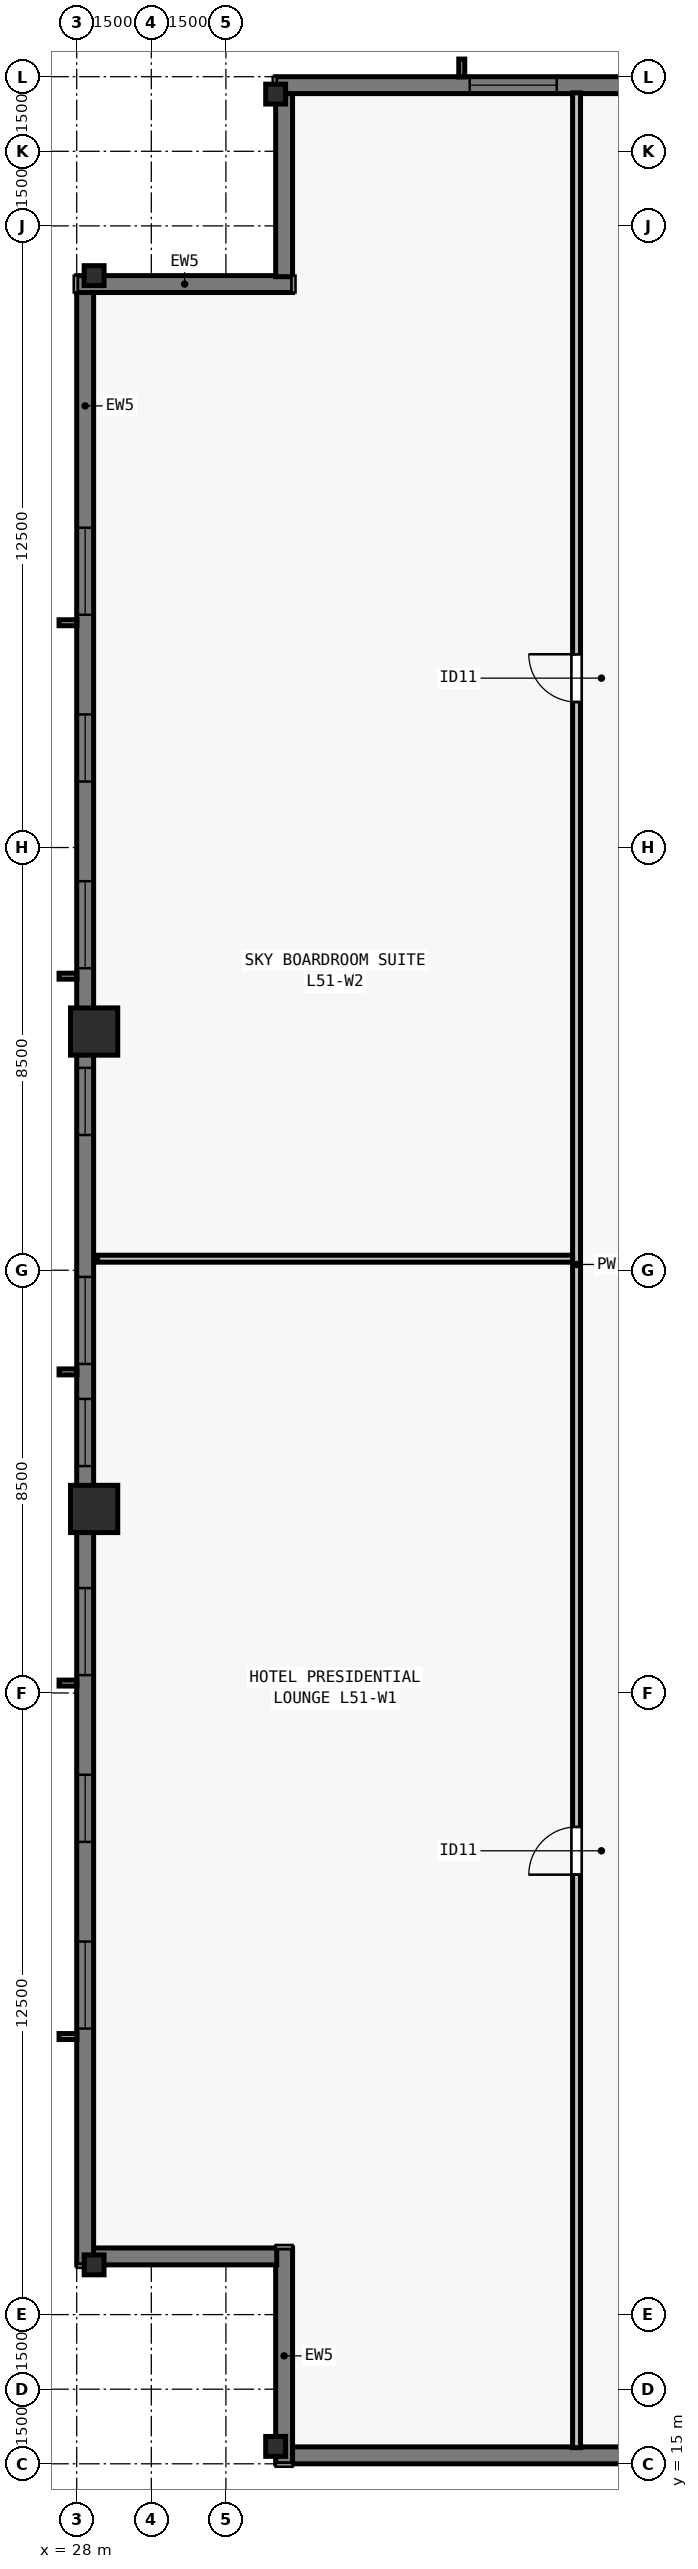
"""IFC4 building model, lengths in metres.
Left out: names, types, materials, properties, quantities, classifications, styles, units other than length and angle.
Written with IfcOpenShell. Run it as: python <this file> out.ifc"""

import sys

from ifc_helpers import new_model, si_unit, direction, frame, frame_2d, origin, origin_2d, place, context, subcontext, project, spatial, rectangle, i_section, extrude, element, fill, save


model = new_model("IFC4")
c1 = context("Model", 3, precision=1e-05, world=origin(), true_north=direction((0.0, 1.0)))
c2 = subcontext(c1, "Body", "Model", "MODEL_VIEW")
j1 = project(units=[si_unit("LENGTHUNIT", "METRE"), si_unit("PLANEANGLEUNIT", "RADIAN")], contexts=[c1])
p1 = place(None, origin())
s1 = spatial("IfcSite", under=j1, at=p1, CompositionType="ELEMENT")
p2 = place(p1, origin())
s2 = spatial("IfcBuilding", under=s1, at=p2, CompositionType="ELEMENT")
p3 = place(p2, frame((0.0, 0.0, 186.5)))
s3 = spatial("IfcBuildingStorey", under=s2, at=p3, CompositionType="ELEMENT", Elevation=186.5)
for number, where, z_axis, x_axis in (
    (1, (32.0, 15.35, 0.0), (0.0, 0.0, 1.0), (1.0, 0.0, 0.0)),
    (2, (32.0, 62.65, 0.0), (0.0, 0.0, 1.0), (1.0, 0.0, 0.0)),
    (3, (28.35, 59.0, 0.0), (0.0, 0.0, 1.0), (0.0, 1.0, 0.0)),
):
    element("IfcColumn", number, at=place(p3, frame(where, z_axis=z_axis, x_axis=x_axis)), inside=s3, PredefinedType="COLUMN", context=c2, shape_type="SweptSolid", body=[
        extrude(i_section(OverallWidth=0.4, OverallDepth=0.4, WebThickness=0.022, FlangeThickness=0.036, at=origin_2d()), origin(), (0.0, 0.0, 1.0), 3.5),
    ])
for number, where, z_axis, x_axis in (
    (4, (28.35, 43.8, 0.0), (0.0, 0.0, 1.0), (0.0, 1.0, 0.0)),
    (5, (28.35, 34.2, 0.0), (0.0, 0.0, 1.0), (0.0, 1.0, 0.0)),
):
    element("IfcColumn", number, at=place(p3, frame(where, z_axis=z_axis, x_axis=x_axis)), inside=s3, PredefinedType="COLUMN", context=c2, shape_type="SweptSolid", body=[
        extrude(rectangle(XDim=0.95, YDim=0.95, at=origin_2d()), origin(), (0.0, 0.0, 1.0), 3.5),
    ])
p4 = place(p3, frame((28.35, 19.0, 0.0), z_axis=(0.0, 0.0, 1.0), x_axis=(0.0, 1.0, 0.0)))
e6 = element("IfcColumn", 6, at=p4, inside=s3, PredefinedType="COLUMN", context=c2, shape_type="SweptSolid", body=[
    extrude(i_section(OverallWidth=0.4, OverallDepth=0.4, WebThickness=0.022, FlangeThickness=0.036, at=origin_2d()), origin(), (0.0, 0.0, 1.0), 3.5),
])
p5 = place(p3, frame((72.0, 15.17, 0.0), z_axis=(0.0, 0.0, 1.0), x_axis=(-1.0, 0.0, 0.0)))
e7 = element("IfcWall", 7, at=p5, inside=s3, PredefinedType="SOLIDWALL", context=c2, shape_type="SweptSolid", body=[
    extrude(rectangle(XDim=39.682, YDim=0.34, at=frame_2d((19.841, 0.0))), origin(), (0.0, 0.0, 1.0), 3.28),
])
p6 = place(p5, frame((11.859, 0.0, 0.8)))
e8 = element("IfcOpeningElement", 8, at=p6, cuts=e7, PredefinedType="OPENING", context=c2, shape_type="SweptSolid", body=[
    extrude(rectangle(XDim=1.75, YDim=1.66, at=frame_2d((0.875, 0.83))), frame((0.0, 0.18, 0.0), z_axis=(0.0, -1.0, 0.0), x_axis=(1.0, 0.0, 0.0)), (0.0, 0.0, 1.0), 0.36),
])
p7 = place(p5, frame((18.966, 0.0, 0.8)))
e9 = element("IfcOpeningElement", 9, at=p7, cuts=e7, PredefinedType="OPENING", context=c2, shape_type="SweptSolid", body=[
    extrude(rectangle(XDim=1.75, YDim=1.66, at=frame_2d((0.875, 0.83))), frame((0.0, 0.18, 0.0), z_axis=(0.0, -1.0, 0.0), x_axis=(1.0, 0.0, 0.0)), (0.0, 0.0, 1.0), 0.36),
])
p8 = place(p5, frame((22.27, 0.0, 0.8)))
e10 = element("IfcOpeningElement", 10, at=p8, cuts=e7, PredefinedType="OPENING", context=c2, shape_type="SweptSolid", body=[
    extrude(rectangle(XDim=1.35, YDim=1.66, at=frame_2d((0.675, 0.83))), frame((0.0, 0.18, 0.0), z_axis=(0.0, -1.0, 0.0), x_axis=(1.0, 0.0, 0.0)), (0.0, 0.0, 1.0), 0.36),
])
p9 = place(p5, frame((26.073, 0.0, 0.8)))
e11 = element("IfcOpeningElement", 11, at=p9, cuts=e7, PredefinedType="OPENING", context=c2, shape_type="SweptSolid", body=[
    extrude(rectangle(XDim=1.75, YDim=1.66, at=frame_2d((0.875, 0.83))), frame((0.0, 0.18, 0.0), z_axis=(0.0, -1.0, 0.0), x_axis=(1.0, 0.0, 0.0)), (0.0, 0.0, 1.0), 0.36),
])
p10 = place(p5, frame((29.827, 0.0, 0.8)))
e12 = element("IfcOpeningElement", 12, at=p10, cuts=e7, PredefinedType="OPENING", context=c2, shape_type="SweptSolid", body=[
    extrude(rectangle(XDim=1.35, YDim=1.66, at=frame_2d((0.675, 0.83))), frame((0.0, 0.18, 0.0), z_axis=(0.0, -1.0, 0.0), x_axis=(1.0, 0.0, 0.0)), (0.0, 0.0, 1.0), 0.36),
])
p11 = place(p3, frame((32.17, 15.0, 0.0), z_axis=(0.0, 0.0, 1.0), x_axis=(0.0, 1.0, 0.0)))
e13 = element("IfcWall", 13, at=p11, inside=s3, PredefinedType="SOLIDWALL", context=c2, shape_type="SweptSolid", body=[
    extrude(rectangle(XDim=4.34, YDim=0.34, at=frame_2d((2.17, 0.0))), origin(), (0.0, 0.0, 1.0), 3.28),
])
p12 = place(p3, frame((32.022, 19.17, 0.0), z_axis=(0.0, 0.0, 1.0), x_axis=(-1.0, 0.0, 0.0)))
e14 = element("IfcWall", 14, at=p12, inside=s3, PredefinedType="SOLIDWALL", context=c2, shape_type="SweptSolid", body=[
    extrude(rectangle(XDim=3.704, YDim=0.34, at=frame_2d((1.852, 0.0))), origin(), (0.0, 0.0, 1.0), 3.28),
])
p13 = place(p3, frame((28.17, 19.0, 0.0), z_axis=(0.0, 0.0, 1.0), x_axis=(0.0, 1.0, 0.0)))
e15 = element("IfcWall", 15, at=p13, inside=s3, PredefinedType="SOLIDWALL", context=c2, shape_type="SweptSolid", body=[
    extrude(rectangle(XDim=39.682, YDim=0.34, at=frame_2d((19.841, 0.0))), origin(), (0.0, 0.0, 1.0), 3.28),
])
p14 = place(p13, frame((4.752, 0.0, 0.8)))
e16 = element("IfcOpeningElement", 16, at=p14, cuts=e15, PredefinedType="OPENING", context=c2, shape_type="SweptSolid", body=[
    extrude(rectangle(XDim=1.75, YDim=1.66, at=frame_2d((0.875, 0.83))), frame((0.0, 0.18, 0.0), z_axis=(0.0, -1.0, 0.0), x_axis=(1.0, 0.0, 0.0)), (0.0, 0.0, 1.0), 0.36),
])
p15 = place(p13, frame((8.505, 0.0, 0.8)))
e17 = element("IfcOpeningElement", 17, at=p15, cuts=e15, PredefinedType="OPENING", context=c2, shape_type="SweptSolid", body=[
    extrude(rectangle(XDim=1.35, YDim=1.66, at=frame_2d((0.675, 0.83))), frame((0.0, 0.18, 0.0), z_axis=(0.0, -1.0, 0.0), x_axis=(1.0, 0.0, 0.0)), (0.0, 0.0, 1.0), 0.36),
])
p16 = place(p13, frame((11.859, 0.0, 0.8)))
e18 = element("IfcOpeningElement", 18, at=p16, cuts=e15, PredefinedType="OPENING", context=c2, shape_type="SweptSolid", body=[
    extrude(rectangle(XDim=1.75, YDim=1.66, at=frame_2d((0.875, 0.83))), frame((0.0, 0.18, 0.0), z_axis=(0.0, -1.0, 0.0), x_axis=(1.0, 0.0, 0.0)), (0.0, 0.0, 1.0), 0.36),
])
p17 = place(p13, frame((16.062, 0.0, 0.8)))
e19 = element("IfcOpeningElement", 19, at=p17, cuts=e15, PredefinedType="OPENING", context=c2, shape_type="SweptSolid", body=[
    extrude(rectangle(XDim=1.35, YDim=1.66, at=frame_2d((0.675, 0.83))), frame((0.0, 0.18, 0.0), z_axis=(0.0, -1.0, 0.0), x_axis=(1.0, 0.0, 0.0)), (0.0, 0.0, 1.0), 0.36),
])
p18 = place(p13, frame((18.116, 0.0, 0.8)))
e20 = element("IfcOpeningElement", 20, at=p18, cuts=e15, PredefinedType="OPENING", context=c2, shape_type="SweptSolid", body=[
    extrude(rectangle(XDim=1.75, YDim=1.66, at=frame_2d((0.875, 0.83))), frame((0.0, 0.18, 0.0), z_axis=(0.0, -1.0, 0.0), x_axis=(1.0, 0.0, 0.0)), (0.0, 0.0, 1.0), 0.36),
])
p19 = place(p13, frame((22.719, 0.0, 0.8)))
e21 = element("IfcOpeningElement", 21, at=p19, cuts=e15, PredefinedType="OPENING", context=c2, shape_type="SweptSolid", body=[
    extrude(rectangle(XDim=1.35, YDim=1.66, at=frame_2d((0.675, 0.83))), frame((0.0, 0.18, 0.0), z_axis=(0.0, -1.0, 0.0), x_axis=(1.0, 0.0, 0.0)), (0.0, 0.0, 1.0), 0.36),
])
p20 = place(p13, frame((26.073, 0.0, 0.8)))
e22 = element("IfcOpeningElement", 22, at=p20, cuts=e15, PredefinedType="OPENING", context=c2, shape_type="SweptSolid", body=[
    extrude(rectangle(XDim=1.75, YDim=1.66, at=frame_2d((0.875, 0.83))), frame((0.0, 0.18, 0.0), z_axis=(0.0, -1.0, 0.0), x_axis=(1.0, 0.0, 0.0)), (0.0, 0.0, 1.0), 0.36),
])
p21 = place(p13, frame((29.827, 0.0, 0.8)))
e23 = element("IfcOpeningElement", 23, at=p21, cuts=e15, PredefinedType="OPENING", context=c2, shape_type="SweptSolid", body=[
    extrude(rectangle(XDim=1.35, YDim=1.66, at=frame_2d((0.675, 0.83))), frame((0.0, 0.18, 0.0), z_axis=(0.0, -1.0, 0.0), x_axis=(1.0, 0.0, 0.0)), (0.0, 0.0, 1.0), 0.36),
])
p22 = place(p13, frame((33.18, 0.0, 0.8)))
e24 = element("IfcOpeningElement", 24, at=p22, cuts=e15, PredefinedType="OPENING", context=c2, shape_type="SweptSolid", body=[
    extrude(rectangle(XDim=1.75, YDim=1.66, at=frame_2d((0.875, 0.83))), frame((0.0, 0.18, 0.0), z_axis=(0.0, -1.0, 0.0), x_axis=(1.0, 0.0, 0.0)), (0.0, 0.0, 1.0), 0.36),
])
p23 = place(p3, frame((28.0, 58.83, 0.0), z_axis=(0.0, 0.0, 1.0), x_axis=(1.0, 0.0, 0.0)))
e25 = element("IfcWall", 25, at=p23, inside=s3, PredefinedType="SOLIDWALL", context=c2, shape_type="SweptSolid", body=[
    extrude(rectangle(XDim=4.34, YDim=0.34, at=frame_2d((2.17, 0.0))), origin(), (0.0, 0.0, 1.0), 3.28),
])
p24 = place(p3, frame((32.17, 58.978, 0.0), z_axis=(0.0, 0.0, 1.0), x_axis=(0.0, 1.0, 0.0)))
e26 = element("IfcWall", 26, at=p24, inside=s3, PredefinedType="SOLIDWALL", context=c2, shape_type="SweptSolid", body=[
    extrude(rectangle(XDim=3.704, YDim=0.34, at=frame_2d((1.852, 0.0))), origin(), (0.0, 0.0, 1.0), 3.28),
])
p25 = place(p3, frame((32.0, 62.83, 0.0), z_axis=(0.0, 0.0, 1.0), x_axis=(1.0, 0.0, 0.0)))
e27 = element("IfcWall", 27, at=p25, inside=s3, PredefinedType="SOLIDWALL", context=c2, shape_type="SweptSolid", body=[
    extrude(rectangle(XDim=39.682, YDim=0.34, at=frame_2d((19.841, 0.0))), origin(), (0.0, 0.0, 1.0), 3.28),
])
p26 = place(p25, frame((3.902, 0.0, 0.8)))
e28 = element("IfcOpeningElement", 28, at=p26, cuts=e27, PredefinedType="OPENING", context=c2, shape_type="SweptSolid", body=[
    extrude(rectangle(XDim=1.75, YDim=1.66, at=frame_2d((0.875, 0.83))), frame((0.0, 0.18, 0.0), z_axis=(0.0, -1.0, 0.0), x_axis=(1.0, 0.0, 0.0)), (0.0, 0.0, 1.0), 0.36),
])
p27 = place(p25, frame((8.505, 0.0, 0.8)))
e29 = element("IfcOpeningElement", 29, at=p27, cuts=e27, PredefinedType="OPENING", context=c2, shape_type="SweptSolid", body=[
    extrude(rectangle(XDim=1.35, YDim=1.66, at=frame_2d((0.675, 0.83))), frame((0.0, 0.18, 0.0), z_axis=(0.0, -1.0, 0.0), x_axis=(1.0, 0.0, 0.0)), (0.0, 0.0, 1.0), 0.36),
])
p28 = place(p25, frame((11.859, 0.0, 0.8)))
e30 = element("IfcOpeningElement", 30, at=p28, cuts=e27, PredefinedType="OPENING", context=c2, shape_type="SweptSolid", body=[
    extrude(rectangle(XDim=1.75, YDim=1.66, at=frame_2d((0.875, 0.83))), frame((0.0, 0.18, 0.0), z_axis=(0.0, -1.0, 0.0), x_axis=(1.0, 0.0, 0.0)), (0.0, 0.0, 1.0), 0.36),
])
p29 = place(p25, frame((16.062, 0.0, 0.8)))
e31 = element("IfcOpeningElement", 31, at=p29, cuts=e27, PredefinedType="OPENING", context=c2, shape_type="SweptSolid", body=[
    extrude(rectangle(XDim=1.35, YDim=1.66, at=frame_2d((0.675, 0.83))), frame((0.0, 0.18, 0.0), z_axis=(0.0, -1.0, 0.0), x_axis=(1.0, 0.0, 0.0)), (0.0, 0.0, 1.0), 0.36),
])
p30 = place(p25, frame((17.716, 0.0, 0.8)))
e32 = element("IfcOpeningElement", 32, at=p30, cuts=e27, PredefinedType="OPENING", context=c2, shape_type="SweptSolid", body=[
    extrude(rectangle(XDim=1.75, YDim=1.66, at=frame_2d((0.875, 0.83))), frame((0.0, 0.18, 0.0), z_axis=(0.0, -1.0, 0.0), x_axis=(1.0, 0.0, 0.0)), (0.0, 0.0, 1.0), 0.36),
])
p31 = place(p25, frame((22.719, 0.0, 0.8)))
e33 = element("IfcOpeningElement", 33, at=p31, cuts=e27, PredefinedType="OPENING", context=c2, shape_type="SweptSolid", body=[
    extrude(rectangle(XDim=1.35, YDim=1.66, at=frame_2d((0.675, 0.83))), frame((0.0, 0.18, 0.0), z_axis=(0.0, -1.0, 0.0), x_axis=(1.0, 0.0, 0.0)), (0.0, 0.0, 1.0), 0.36),
])
p32 = place(p25, frame((26.073, 0.0, 0.8)))
e34 = element("IfcOpeningElement", 34, at=p32, cuts=e27, PredefinedType="OPENING", context=c2, shape_type="SweptSolid", body=[
    extrude(rectangle(XDim=1.75, YDim=1.66, at=frame_2d((0.875, 0.83))), frame((0.0, 0.18, 0.0), z_axis=(0.0, -1.0, 0.0), x_axis=(1.0, 0.0, 0.0)), (0.0, 0.0, 1.0), 0.36),
])
p33 = place(p25, frame((30.677, 0.0, 0.8)))
e35 = element("IfcOpeningElement", 35, at=p33, cuts=e27, PredefinedType="OPENING", context=c2, shape_type="SweptSolid", body=[
    extrude(rectangle(XDim=1.35, YDim=1.66, at=frame_2d((0.675, 0.83))), frame((0.0, 0.18, 0.0), z_axis=(0.0, -1.0, 0.0), x_axis=(1.0, 0.0, 0.0)), (0.0, 0.0, 1.0), 0.36),
])
p34 = place(p25, frame((33.18, 0.0, 0.8)))
e36 = element("IfcOpeningElement", 36, at=p34, cuts=e27, PredefinedType="OPENING", context=c2, shape_type="SweptSolid", body=[
    extrude(rectangle(XDim=1.75, YDim=1.66, at=frame_2d((0.875, 0.83))), frame((0.0, 0.18, 0.0), z_axis=(0.0, -1.0, 0.0), x_axis=(1.0, 0.0, 0.0)), (0.0, 0.0, 1.0), 0.36),
])
p35 = place(p3, frame((38.05, 15.325, 0.0), z_axis=(0.0, 0.0, 1.0), x_axis=(0.0, 1.0, 0.0)))
e37 = element("IfcWall", 37, at=p35, inside=s3, PredefinedType="PARTITIONING", context=c2, shape_type="SweptSolid", body=[
    extrude(rectangle(XDim=47.35, YDim=0.16, at=frame_2d((23.675, 0.0))), origin(), (0.0, 0.0, 1.0), 2.555),
])
p36 = place(p35, frame((11.521, 0.0, 0.0)))
e38 = element("IfcOpeningElement", 38, at=p36, cuts=e37, PredefinedType="OPENING", context=c2, shape_type="SweptSolid", body=[
    extrude(rectangle(XDim=0.96, YDim=2.12, at=frame_2d((0.48, 1.06))), frame((0.0, 0.09, 0.0), z_axis=(0.0, -1.0, 0.0), x_axis=(1.0, 0.0, 0.0)), (0.0, 0.0, 1.0), 0.18),
])
p37 = place(p35, frame((35.101, 0.0, 0.0)))
e39 = element("IfcOpeningElement", 39, at=p37, cuts=e37, PredefinedType="OPENING", context=c2, shape_type="SweptSolid", body=[
    extrude(rectangle(XDim=0.96, YDim=2.12, at=frame_2d((0.48, 1.06))), frame((0.0, 0.09, 0.0), z_axis=(0.0, -1.0, 0.0), x_axis=(1.0, 0.0, 0.0)), (0.0, 0.0, 1.0), 0.18),
])
p38 = place(p3, frame((28.42, 39.232, 0.0), z_axis=(0.0, 0.0, 1.0), x_axis=(1.0, 0.0, 0.0)))
e40 = element("IfcWall", 40, at=p38, inside=s3, PredefinedType="PARTITIONING", context=c2, shape_type="SweptSolid", body=[
    extrude(rectangle(XDim=9.55, YDim=0.14, at=frame_2d((4.775, 0.0))), origin(), (0.0, 0.0, 1.0), 2.896),
])
p39 = place(p14, origin())
e41 = element("IfcWindow", 41, at=p39, inside=s3, PartitioningType="SINGLE_PANEL", PredefinedType="WINDOW", context=c2, shape_type="SweptSolid", body=[
    extrude(rectangle(XDim=1.75, YDim=1.66, at=frame_2d((0.875, 0.83))), frame((0.0, -0.05, 0.0), z_axis=(0.0, -1.0, 0.0), x_axis=(1.0, 0.0, 0.0)), (0.0, 0.0, 1.0), 0.06),
])
fill(e16, e41)
p40 = place(p15, origin())
e42 = element("IfcWindow", 42, at=p40, inside=s3, PartitioningType="SINGLE_PANEL", PredefinedType="WINDOW", context=c2, shape_type="SweptSolid", body=[
    extrude(rectangle(XDim=1.35, YDim=1.66, at=frame_2d((0.675, 0.83))), frame((0.0, -0.05, 0.0), z_axis=(0.0, -1.0, 0.0), x_axis=(1.0, 0.0, 0.0)), (0.0, 0.0, 1.0), 0.06),
])
fill(e17, e42)
p41 = place(p16, origin())
e43 = element("IfcWindow", 43, at=p41, inside=s3, PartitioningType="SINGLE_PANEL", PredefinedType="WINDOW", context=c2, shape_type="SweptSolid", body=[
    extrude(rectangle(XDim=1.75, YDim=1.66, at=frame_2d((0.875, 0.83))), frame((0.0, -0.05, 0.0), z_axis=(0.0, -1.0, 0.0), x_axis=(1.0, 0.0, 0.0)), (0.0, 0.0, 1.0), 0.06),
])
fill(e18, e43)
p42 = place(p17, origin())
e44 = element("IfcWindow", 44, at=p42, inside=s3, PartitioningType="SINGLE_PANEL", PredefinedType="WINDOW", context=c2, shape_type="SweptSolid", body=[
    extrude(rectangle(XDim=1.35, YDim=1.66, at=frame_2d((0.675, 0.83))), frame((0.0, -0.05, 0.0), z_axis=(0.0, -1.0, 0.0), x_axis=(1.0, 0.0, 0.0)), (0.0, 0.0, 1.0), 0.06),
])
fill(e19, e44)
p43 = place(p18, origin())
e45 = element("IfcWindow", 45, at=p43, inside=s3, PartitioningType="SINGLE_PANEL", PredefinedType="WINDOW", context=c2, shape_type="SweptSolid", body=[
    extrude(rectangle(XDim=1.75, YDim=1.66, at=frame_2d((0.875, 0.83))), frame((0.0, -0.05, 0.0), z_axis=(0.0, -1.0, 0.0), x_axis=(1.0, 0.0, 0.0)), (0.0, 0.0, 1.0), 0.06),
])
fill(e20, e45)
p44 = place(p19, origin())
e46 = element("IfcWindow", 46, at=p44, inside=s3, PartitioningType="SINGLE_PANEL", PredefinedType="WINDOW", context=c2, shape_type="SweptSolid", body=[
    extrude(rectangle(XDim=1.35, YDim=1.66, at=frame_2d((0.675, 0.83))), frame((0.0, -0.05, 0.0), z_axis=(0.0, -1.0, 0.0), x_axis=(1.0, 0.0, 0.0)), (0.0, 0.0, 1.0), 0.06),
])
fill(e21, e46)
p45 = place(p20, origin())
e47 = element("IfcWindow", 47, at=p45, inside=s3, PartitioningType="SINGLE_PANEL", PredefinedType="WINDOW", context=c2, shape_type="SweptSolid", body=[
    extrude(rectangle(XDim=1.75, YDim=1.66, at=frame_2d((0.875, 0.83))), frame((0.0, -0.05, 0.0), z_axis=(0.0, -1.0, 0.0), x_axis=(1.0, 0.0, 0.0)), (0.0, 0.0, 1.0), 0.06),
])
fill(e22, e47)
p46 = place(p21, origin())
e48 = element("IfcWindow", 48, at=p46, inside=s3, PartitioningType="SINGLE_PANEL", PredefinedType="WINDOW", context=c2, shape_type="SweptSolid", body=[
    extrude(rectangle(XDim=1.35, YDim=1.66, at=frame_2d((0.675, 0.83))), frame((0.0, -0.05, 0.0), z_axis=(0.0, -1.0, 0.0), x_axis=(1.0, 0.0, 0.0)), (0.0, 0.0, 1.0), 0.06),
])
fill(e23, e48)
p47 = place(p22, origin())
e49 = element("IfcWindow", 49, at=p47, inside=s3, PartitioningType="SINGLE_PANEL", PredefinedType="WINDOW", context=c2, shape_type="SweptSolid", body=[
    extrude(rectangle(XDim=1.75, YDim=1.66, at=frame_2d((0.875, 0.83))), frame((0.0, -0.05, 0.0), z_axis=(0.0, -1.0, 0.0), x_axis=(1.0, 0.0, 0.0)), (0.0, 0.0, 1.0), 0.06),
])
fill(e24, e49)
p48 = place(p26, origin())
e50 = element("IfcWindow", 50, at=p48, inside=s3, PartitioningType="SINGLE_PANEL", PredefinedType="WINDOW", context=c2, shape_type="SweptSolid", body=[
    extrude(rectangle(XDim=1.75, YDim=1.66, at=frame_2d((0.875, 0.83))), frame((0.0, -0.05, 0.0), z_axis=(0.0, -1.0, 0.0), x_axis=(1.0, 0.0, 0.0)), (0.0, 0.0, 1.0), 0.06),
])
fill(e28, e50)
p49 = place(p36, origin())
e51 = element("IfcDoor", 51, at=p49, inside=s3, OperationType="SINGLE_SWING_LEFT", PredefinedType="DOOR", context=c2, shape_type="SweptSolid", body=[
    extrude(rectangle(XDim=0.96, YDim=2.12, at=frame_2d((0.48, 1.06))), frame((0.0, 0.025, 0.0), z_axis=(0.0, -1.0, 0.0), x_axis=(1.0, 0.0, 0.0)), (0.0, 0.0, 1.0), 0.05),
])
fill(e38, e51)
p50 = place(p37, origin())
e52 = element("IfcDoor", 52, at=p50, inside=s3, OperationType="SINGLE_SWING_RIGHT", PredefinedType="DOOR", context=c2, shape_type="SweptSolid", body=[
    extrude(rectangle(XDim=0.96, YDim=2.12, at=frame_2d((0.48, 1.06))), frame((0.0, 0.025, 0.0), z_axis=(0.0, -1.0, 0.0), x_axis=(1.0, 0.0, 0.0)), (0.0, 0.0, 1.0), 0.05),
])
fill(e39, e52)
save(model, sys.argv[1])
